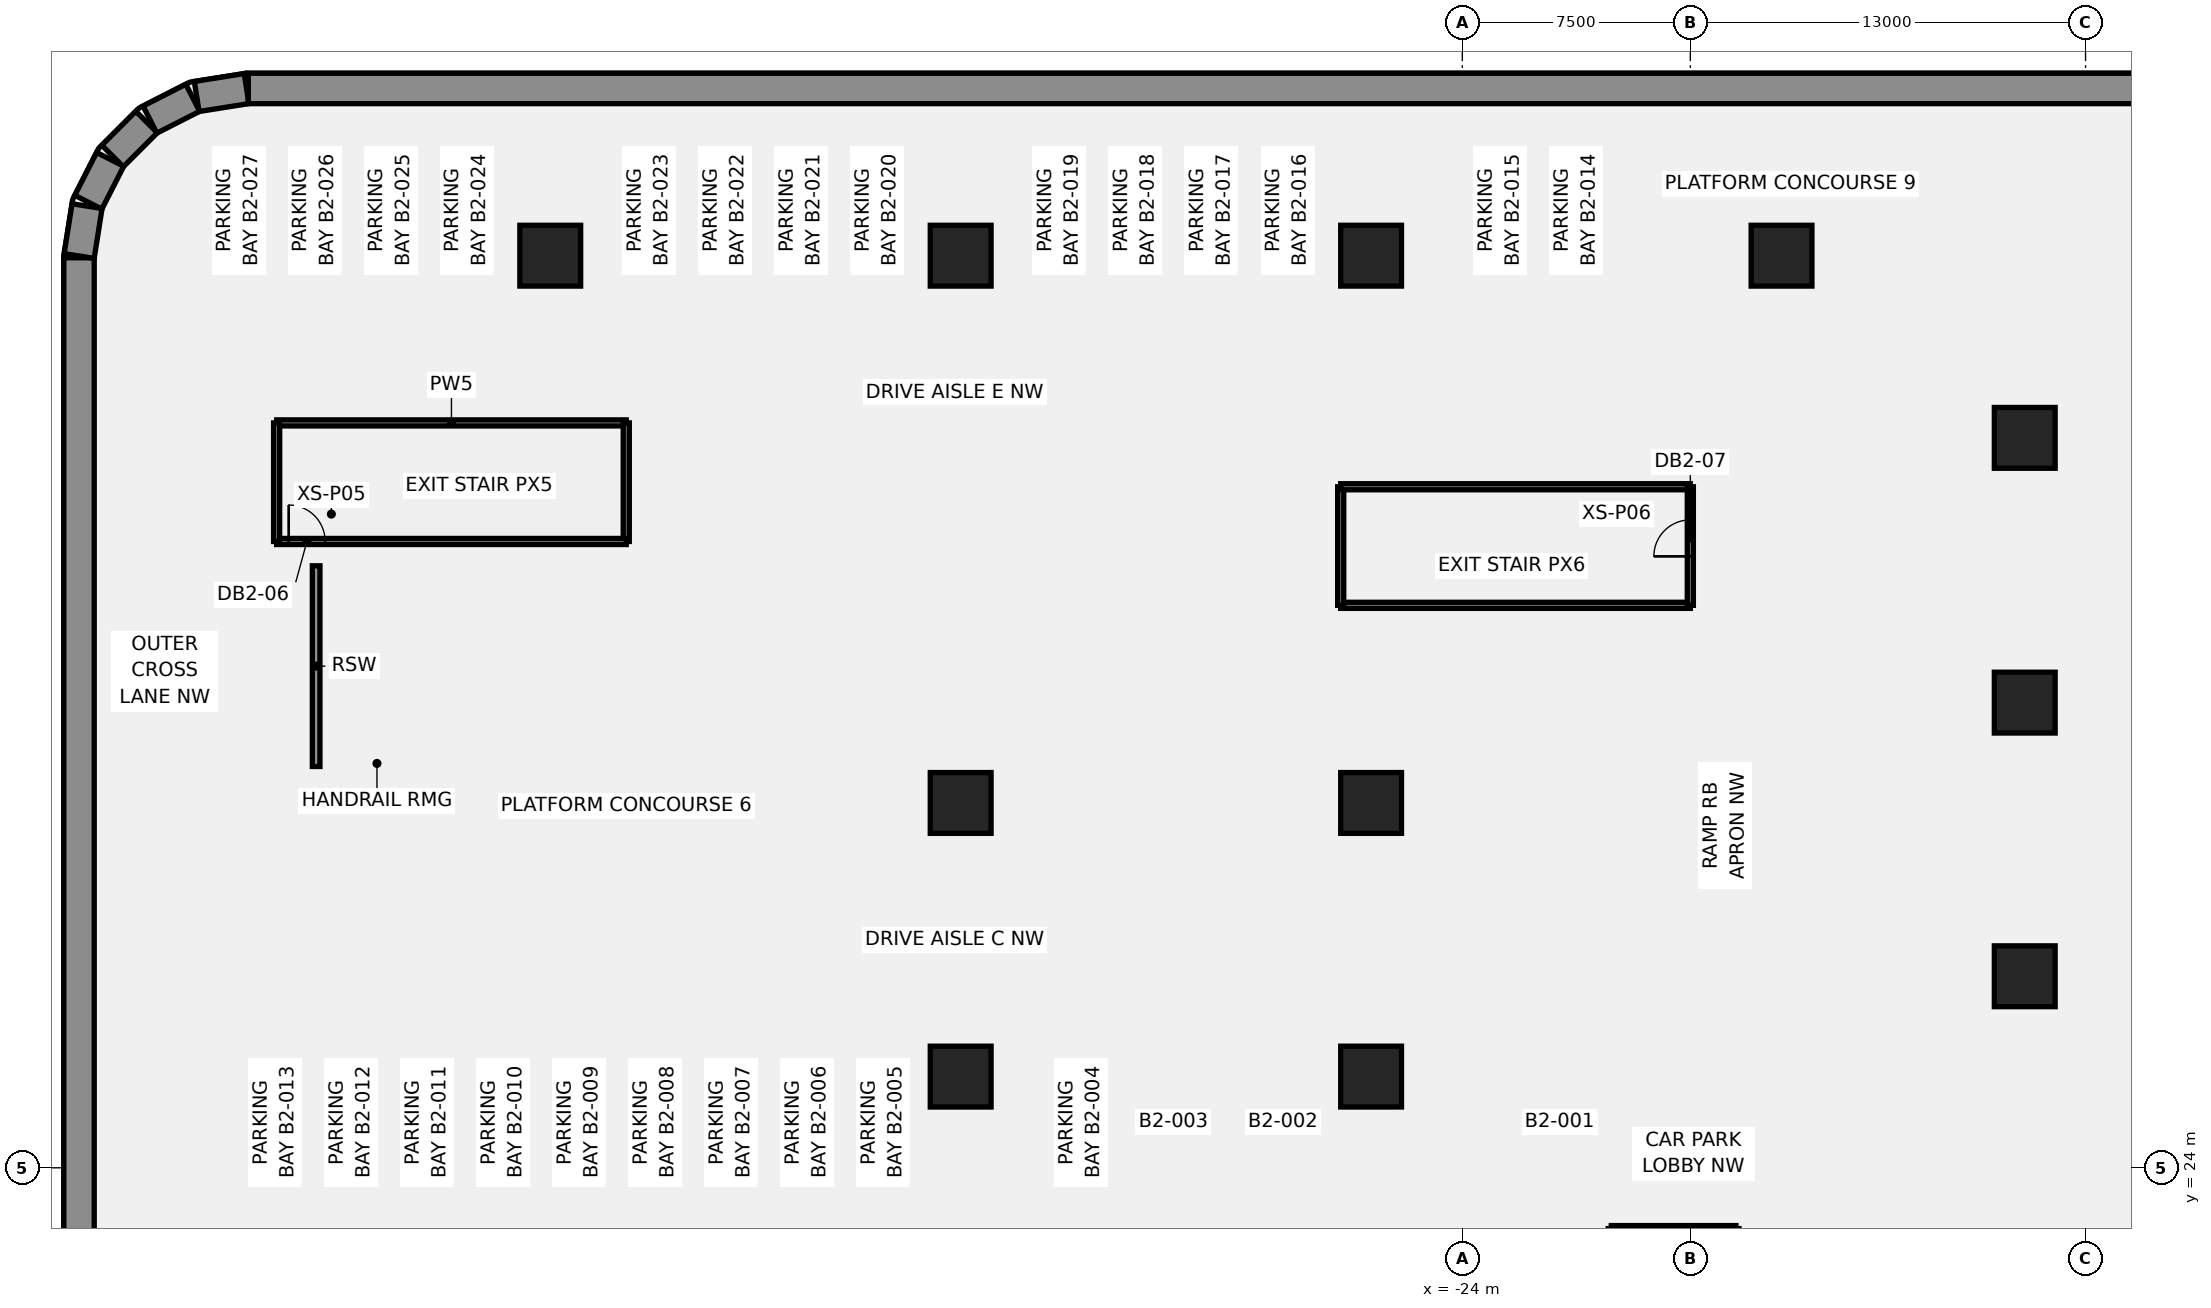
"""IFC4 building model, lengths in metres.
Left out: names, types, materials, properties, quantities, classifications, styles, units other than length and angle.
Written with IfcOpenShell. Run it as: python <this file> out.ifc"""

import sys

from ifc_helpers import new_model, si_unit, direction, frame, frame_2d, origin, origin_2d, place, context, subcontext, project, spatial, rectangle, extrude, element, fill, save


model = new_model("IFC4")
c1 = context("Model", 3, precision=1e-05, world=origin(), true_north=direction((0.0, 1.0)))
c2 = subcontext(c1, "Body", "Model", "MODEL_VIEW")
j1 = project(units=[si_unit("LENGTHUNIT", "METRE"), si_unit("PLANEANGLEUNIT", "RADIAN")], contexts=[c1])
p1 = place(None, origin())
s1 = spatial("IfcSite", under=j1, at=p1, CompositionType="ELEMENT")
p2 = place(p1, origin())
s2 = spatial("IfcBuilding", under=s1, at=p2, CompositionType="ELEMENT")
p3 = place(p2, frame((0.0, 0.0, -14.0)))
s3 = spatial("IfcBuildingStorey", under=s2, at=p3, CompositionType="ELEMENT", Elevation=-14.0)
p4 = place(p3, frame((-69.5, -53.931, -0.45), z_axis=(0.0, 0.0, 1.0), x_axis=(0.0, 1.0, 0.0)))
e1 = element("IfcWall", 1, at=p4, inside=s3, PredefinedType="SOLIDWALL", context=c2, shape_type="SweptSolid", body=[
    extrude(rectangle(XDim=107.863, YDim=1.0, at=frame_2d((53.931, 0.0))), origin(), (0.0, 0.0, 1.0), 7.0),
])
p5 = place(p3, frame((-69.495, 53.99, -0.45), z_axis=(0.0, 0.0, 1.0), x_axis=(0.156430639922, 0.987688946427, 0.0)))
e2 = element("IfcWall", 2, at=p5, inside=s3, PredefinedType="SOLIDWALL", context=c2, shape_type="SweptSolid", body=[
    extrude(rectangle(XDim=1.661, YDim=1.0, at=frame_2d((0.83, 0.0))), origin(), (0.0, 0.0, 1.0), 7.0),
])
for number, where, z_axis, x_axis in (
    (3, (-69.194, 55.759, -0.45), (0.0, 0.0, 1.0), (0.454, 0.891, 0.0)),
    (4, (-68.396, 57.278, -0.45), (0.0, 0.0, 1.0), (0.707, 0.707, 0.0)),
    (5, (-67.168, 58.476, -0.45), (0.0, 0.0, 1.0), (0.891, 0.454, 0.0)),
):
    element("IfcWall", number, at=place(p3, frame(where, z_axis=z_axis, x_axis=x_axis)), inside=s3, PredefinedType="SOLIDWALL", context=c2, shape_type="SweptSolid", body=[
        extrude(rectangle(XDim=1.581, YDim=1.0, at=frame_2d((0.791, 0.0))), origin(), (0.0, 0.0, 1.0), 7.0),
    ])
p6 = place(p3, frame((-65.63, 59.236, -0.45), z_axis=(0.0, 0.0, 1.0), x_axis=(0.987688946427, 0.156430639922, 0.0)))
e6 = element("IfcWall", 6, at=p6, inside=s3, PredefinedType="SOLIDWALL", context=c2, shape_type="SweptSolid", body=[
    extrude(rectangle(XDim=1.661, YDim=1.0, at=frame_2d((0.83, 0.0))), origin(), (0.0, 0.0, 1.0), 7.0),
])
p7 = place(p3, frame((-63.931, 59.5, -0.45), z_axis=(0.0, 0.0, 1.0), x_axis=(1.0, 0.0, 0.0)))
e7 = element("IfcWall", 7, at=p7, inside=s3, PredefinedType="SOLIDWALL", context=c2, shape_type="SweptSolid", body=[
    extrude(rectangle(XDim=127.863, YDim=1.0, at=frame_2d((63.931, 0.0))), origin(), (0.0, 0.0, 1.0), 7.0),
])
for number, where, z_axis, x_axis in (
    (8, (-5.5, 39.3, -0.45), (0.0, 0.0, 1.0), (1.0, 0.0, 0.0)),
    (9, (-5.5, 30.3, -0.45), (0.0, 0.0, 1.0), (1.0, 0.0, 0.0)),
    (10, (-5.5, 48.008, -0.45), (0.0, 0.0, 1.0), (1.0, 0.0, 0.0)),
    (11, (-54.0, 54.0, -0.45), (0.0, 0.0, 1.0), (1.0, 0.0, 0.0)),
    (12, (-40.5, 27.0, -0.45), (0.0, 0.0, 1.0), (1.0, 0.0, 0.0)),
    (13, (-40.5, 36.0, -0.45), (0.0, 0.0, 1.0), (1.0, 0.0, 0.0)),
    (14, (-40.5, 54.0, -0.45), (0.0, 0.0, 1.0), (1.0, 0.0, 0.0)),
    (15, (-27.0, 27.0, -0.45), (0.0, 0.0, 1.0), (1.0, 0.0, 0.0)),
    (16, (-27.0, 36.0, -0.45), (0.0, 0.0, 1.0), (1.0, 0.0, 0.0)),
    (17, (-27.0, 54.0, -0.45), (0.0, 0.0, 1.0), (1.0, 0.0, 0.0)),
    (18, (-13.5, 54.0, -0.45), (0.0, 0.0, 1.0), (1.0, 0.0, 0.0)),
):
    element("IfcColumn", number, at=place(p3, frame(where, z_axis=z_axis, x_axis=x_axis)), inside=s3, PredefinedType="COLUMN", context=c2, shape_type="SweptSolid", body=[
        extrude(rectangle(XDim=2.0, YDim=2.0, at=origin_2d()), origin(), (0.0, 0.0, 1.0), 7.0),
    ])
p8 = place(p3, frame((-63.0, 48.5, 0.0), z_axis=(0.0, 0.0, 1.0), x_axis=(1.0, 0.0, 0.0)))
e19 = element("IfcWall", 19, at=p8, inside=s3, PredefinedType="PARTITIONING", context=c2, shape_type="SweptSolid", body=[
    extrude(rectangle(XDim=11.5, YDim=0.2, at=frame_2d((5.75, 0.0))), origin(), (0.0, 0.0, 1.0), 6.55),
])
p9 = place(p3, frame((-51.5, 44.6, 0.0), z_axis=(0.0, 0.0, 1.0), x_axis=(0.0, 1.0, 0.0)))
e20 = element("IfcWall", 20, at=p9, inside=s3, PredefinedType="PARTITIONING", context=c2, shape_type="SweptSolid", body=[
    extrude(rectangle(XDim=3.9, YDim=0.2, at=frame_2d((1.95, 0.0))), origin(), (0.0, 0.0, 1.0), 6.55),
])
p10 = place(p3, frame((-63.0, 44.6, 0.0), z_axis=(0.0, 0.0, 1.0), x_axis=(1.0, 0.0, 0.0)))
e21 = element("IfcWall", 21, at=p10, inside=s3, PredefinedType="PARTITIONING", context=c2, shape_type="SweptSolid", body=[
    extrude(rectangle(XDim=11.5, YDim=0.2, at=frame_2d((5.75, 0.0))), origin(), (0.0, 0.0, 1.0), 6.55),
])
p11 = place(p10, frame((0.396, 0.0, 0.0)))
e22 = element("IfcOpeningElement", 22, at=p11, cuts=e21, PredefinedType="OPENING", context=c2, shape_type="SweptSolid", body=[
    extrude(rectangle(XDim=1.2, YDim=2.1, at=frame_2d((0.6, 1.05))), frame((0.0, 0.11, 0.0), z_axis=(0.0, -1.0, 0.0), x_axis=(1.0, 0.0, 0.0)), (0.0, 0.0, 1.0), 0.22),
])
p12 = place(p3, frame((-63.0, 44.6, 0.0), z_axis=(0.0, 0.0, 1.0), x_axis=(0.0, 1.0, 0.0)))
e23 = element("IfcWall", 23, at=p12, inside=s3, PredefinedType="PARTITIONING", context=c2, shape_type="SweptSolid", body=[
    extrude(rectangle(XDim=3.9, YDim=0.2, at=frame_2d((1.95, 0.0))), origin(), (0.0, 0.0, 1.0), 6.55),
])
p13 = place(p3, frame((-19.1, 10.3, 0.0), z_axis=(0.0, 0.0, 1.0), x_axis=(0.0, 1.0, 0.0)))
e24 = element("IfcWall", 24, at=p13, inside=s3, PredefinedType="PARTITIONING", context=c2, shape_type="SweptSolid", body=[
    extrude(rectangle(XDim=11.7, YDim=0.2, at=frame_2d((5.85, 0.0))), origin(), (0.0, 0.0, 1.0), 6.55),
])
p14 = place(p3, frame((-19.1, 22.0, 0.0), z_axis=(0.0, 0.0, 1.0), x_axis=(1.0, 0.0, 0.0)))
e25 = element("IfcWall", 25, at=p14, inside=s3, PredefinedType="PARTITIONING", context=c2, shape_type="SweptSolid", body=[
    extrude(rectangle(XDim=4.1, YDim=0.2, at=frame_2d((2.05, 0.0))), origin(), (0.0, 0.0, 1.0), 6.55),
])
p15 = place(p3, frame((-15.0, 10.3, 0.0), z_axis=(0.0, 0.0, 1.0), x_axis=(0.0, 1.0, 0.0)))
e26 = element("IfcWall", 26, at=p15, inside=s3, PredefinedType="PARTITIONING", context=c2, shape_type="SweptSolid", body=[
    extrude(rectangle(XDim=11.7, YDim=0.2, at=frame_2d((5.85, 0.0))), origin(), (0.0, 0.0, 1.0), 6.55),
])
p16 = place(p3, frame((-28.0, 42.5, 0.0), z_axis=(0.0, 0.0, 1.0), x_axis=(1.0, 0.0, 0.0)))
e27 = element("IfcWall", 27, at=p16, inside=s3, PredefinedType="PARTITIONING", context=c2, shape_type="SweptSolid", body=[
    extrude(rectangle(XDim=11.5, YDim=0.2, at=frame_2d((5.75, 0.0))), origin(), (0.0, 0.0, 1.0), 6.55),
])
p17 = place(p3, frame((-28.0, 42.5, 0.0), z_axis=(0.0, 0.0, 1.0), x_axis=(0.0, 1.0, 0.0)))
e28 = element("IfcWall", 28, at=p17, inside=s3, PredefinedType="PARTITIONING", context=c2, shape_type="SweptSolid", body=[
    extrude(rectangle(XDim=3.9, YDim=0.2, at=frame_2d((1.95, 0.0))), origin(), (0.0, 0.0, 1.0), 6.55),
])
p18 = place(p3, frame((-28.0, 46.4, 0.0), z_axis=(0.0, 0.0, 1.0), x_axis=(1.0, 0.0, 0.0)))
e29 = element("IfcWall", 29, at=p18, inside=s3, PredefinedType="PARTITIONING", context=c2, shape_type="SweptSolid", body=[
    extrude(rectangle(XDim=11.5, YDim=0.2, at=frame_2d((5.75, 0.0))), origin(), (0.0, 0.0, 1.0), 6.55),
])
p19 = place(p3, frame((-16.5, 42.5, 0.0), z_axis=(0.0, 0.0, 1.0), x_axis=(0.0, 1.0, 0.0)))
e30 = element("IfcWall", 30, at=p19, inside=s3, PredefinedType="PARTITIONING", context=c2, shape_type="SweptSolid", body=[
    extrude(rectangle(XDim=3.9, YDim=0.2, at=frame_2d((1.95, 0.0))), origin(), (0.0, 0.0, 1.0), 6.55),
])
p20 = place(p19, frame((1.61, 0.0, 0.0)))
e31 = element("IfcOpeningElement", 31, at=p20, cuts=e30, PredefinedType="OPENING", context=c2, shape_type="SweptSolid", body=[
    extrude(rectangle(XDim=1.2, YDim=2.1, at=frame_2d((0.6, 1.05))), frame((0.0, 0.11, 0.0), z_axis=(0.0, -1.0, 0.0), x_axis=(1.0, 0.0, 0.0)), (0.0, 0.0, 1.0), 0.22),
])
p21 = place(p3, frame((-61.7, 37.2, 0.0), z_axis=(0.0, 0.0, 1.0), x_axis=(0.0, 1.0, 0.0)))
e32 = element("IfcWall", 32, at=p21, inside=s3, PredefinedType="SOLIDWALL", context=c2, shape_type="SweptSolid", body=[
    extrude(rectangle(XDim=6.6, YDim=0.25, at=frame_2d((3.3, 0.0))), origin(), (0.0, 0.0, 1.0), 6.483),
])
p22 = place(p11, origin())
e33 = element("IfcDoor", 33, at=p22, inside=s3, OperationType="SINGLE_SWING_RIGHT", PredefinedType="DOOR", context=c2, shape_type="SweptSolid", body=[
    extrude(rectangle(XDim=1.2, YDim=2.1, at=frame_2d((0.6, 1.05))), frame((0.0, 0.025, 0.0), z_axis=(0.0, -1.0, 0.0), x_axis=(1.0, 0.0, 0.0)), (0.0, 0.0, 1.0), 0.05),
])
fill(e22, e33)
p23 = place(p20, origin())
e34 = element("IfcDoor", 34, at=p23, inside=s3, OperationType="SINGLE_SWING_LEFT", PredefinedType="DOOR", context=c2, shape_type="SweptSolid", body=[
    extrude(rectangle(XDim=1.2, YDim=2.1, at=frame_2d((0.6, 1.05))), frame((0.0, 0.025, 0.0), z_axis=(0.0, -1.0, 0.0), x_axis=(1.0, 0.0, 0.0)), (0.0, 0.0, 1.0), 0.05),
])
fill(e31, e34)
save(model, sys.argv[1])
